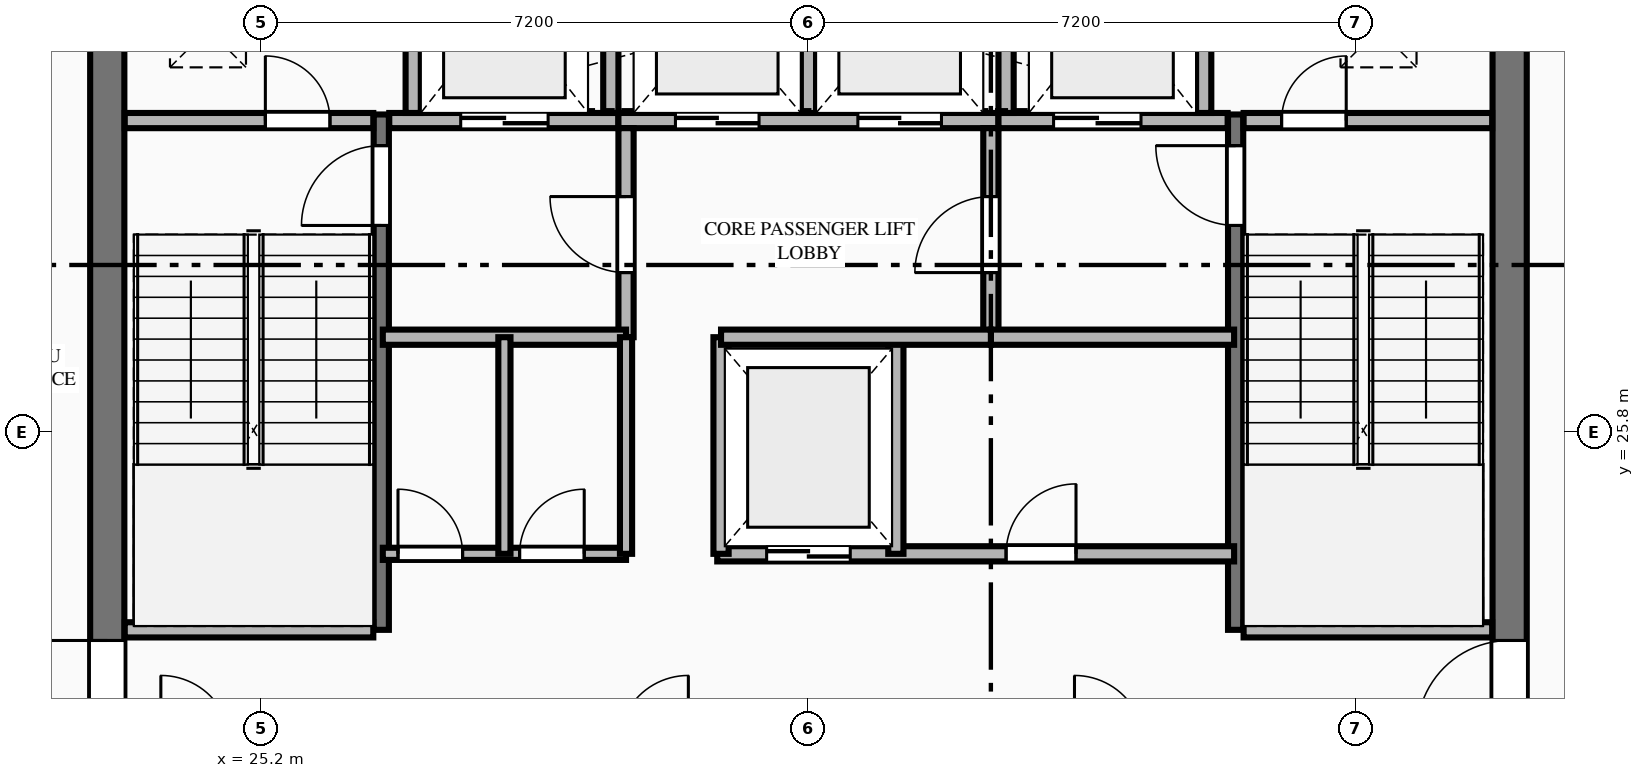
"""IFC4 building model, lengths in metres.
Left out: names, types, materials, properties, quantities, classifications, styles, units other than length and angle.
Written with IfcOpenShell. Run it as: python <this file> out.ifc"""

import sys

from ifc_helpers import new_model, si_unit, direction, frame, frame_2d, origin, place, context, subcontext, project, spatial, rectangle, extrude, element, fill, save


model = new_model("IFC4")
c1 = context("Model", 3, precision=1e-05, world=origin(), true_north=direction((0.0, 1.0)))
c2 = subcontext(c1, "Body", "Model", "MODEL_VIEW")
j1 = project(units=[si_unit("LENGTHUNIT", "METRE"), si_unit("PLANEANGLEUNIT", "RADIAN")], contexts=[c1])
p1 = place(None, origin())
s1 = spatial("IfcSite", under=j1, at=p1, CompositionType="ELEMENT")
p2 = place(p1, origin())
s2 = spatial("IfcBuilding", under=s1, at=p2, CompositionType="ELEMENT")
p3 = place(p2, frame((0.0, 0.0, 287.5)))
s3 = spatial("IfcBuildingStorey", under=s2, at=p3, CompositionType="ELEMENT", Elevation=287.5)
p4 = place(p3, frame((23.175, 19.0, 0.0), z_axis=(0.0, 0.0, 1.0), x_axis=(0.0, 1.0, 0.0)))
e1 = element("IfcWall", 1, at=p4, inside=s3, PredefinedType="SHEAR", context=c2, shape_type="SweptSolid", body=[
    extrude(rectangle(XDim=13.8, YDim=0.45, at=frame_2d((6.9, 0.0))), origin(), (0.0, 0.0, 1.0), 3.8),
])
p5 = place(p4, frame((2.84, 0.0, 0.0)))
e2 = element("IfcOpeningElement", 2, at=p5, cuts=e1, PredefinedType="OPENING", context=c2, shape_type="SweptSolid", body=[
    extrude(rectangle(XDim=1.22, YDim=2.25, at=frame_2d((0.61, 1.125))), frame((0.0, 0.235, 0.0), z_axis=(0.0, -1.0, 0.0), x_axis=(1.0, 0.0, 0.0)), (0.0, 0.0, 1.0), 0.47),
])
p6 = place(p3, frame((41.625, 19.0, 0.0), z_axis=(0.0, 0.0, 1.0), x_axis=(0.0, 1.0, 0.0)))
e3 = element("IfcWall", 3, at=p6, inside=s3, PredefinedType="SHEAR", context=c2, shape_type="SweptSolid", body=[
    extrude(rectangle(XDim=13.8, YDim=0.45, at=frame_2d((6.9, 0.0))), origin(), (0.0, 0.0, 1.0), 3.8),
])
p7 = place(p6, frame((2.84, 0.0, 0.0)))
e4 = element("IfcOpeningElement", 4, at=p7, cuts=e3, PredefinedType="OPENING", context=c2, shape_type="SweptSolid", body=[
    extrude(rectangle(XDim=1.22, YDim=2.25, at=frame_2d((0.61, 1.125))), frame((0.0, 0.235, 0.0), z_axis=(0.0, -1.0, 0.0), x_axis=(1.0, 0.0, 0.0)), (0.0, 0.0, 1.0), 0.47),
])
p8 = place(p3, frame((26.78, 23.2, 0.0), z_axis=(0.0, 0.0, 1.0), x_axis=(0.0, 1.0, 0.0)))
e5 = element("IfcWall", 5, at=p8, inside=s3, PredefinedType="SHEAR", context=c2, shape_type="SweptSolid", body=[
    extrude(rectangle(XDim=6.78, YDim=0.2, at=frame_2d((3.39, 0.0))), origin(), (0.0, 0.0, 1.0), 4.0),
])
p9 = place(p8, frame((5.32, 0.0, 0.0)))
e6 = element("IfcOpeningElement", 6, at=p9, cuts=e5, PredefinedType="OPENING", context=c2, shape_type="SweptSolid", body=[
    extrude(rectangle(XDim=1.05, YDim=2.15, at=frame_2d((0.525, 1.075))), frame((0.0, 0.11, 0.0), z_axis=(0.0, -1.0, 0.0), x_axis=(1.0, 0.0, 0.0)), (0.0, 0.0, 1.0), 0.22),
])
p10 = place(p3, frame((23.405, 23.2, 0.0), z_axis=(0.0, 0.0, 1.0), x_axis=(1.0, 0.0, 0.0)))
e7 = element("IfcWall", 7, at=p10, inside=s3, PredefinedType="PLUMBINGWALL", context=c2, shape_type="SweptSolid", body=[
    extrude(rectangle(XDim=3.27, YDim=0.2, at=frame_2d((1.635, 0.0))), origin(), (0.0, 0.0, 1.0), 3.8),
])
p11 = place(p3, frame((38.02, 23.2, 0.0), z_axis=(0.0, 0.0, 1.0), x_axis=(0.0, 1.0, 0.0)))
e8 = element("IfcWall", 8, at=p11, inside=s3, PredefinedType="SHEAR", context=c2, shape_type="SweptSolid", body=[
    extrude(rectangle(XDim=6.78, YDim=0.2, at=frame_2d((3.39, 0.0))), origin(), (0.0, 0.0, 1.0), 4.0),
])
p12 = place(p11, frame((5.32, 0.0, 0.0)))
e9 = element("IfcOpeningElement", 9, at=p12, cuts=e8, PredefinedType="OPENING", context=c2, shape_type="SweptSolid", body=[
    extrude(rectangle(XDim=1.05, YDim=2.15, at=frame_2d((0.525, 1.075))), frame((0.0, 0.11, 0.0), z_axis=(0.0, -1.0, 0.0), x_axis=(1.0, 0.0, 0.0)), (0.0, 0.0, 1.0), 0.22),
])
p13 = place(p3, frame((38.125, 23.2, 0.0), z_axis=(0.0, 0.0, 1.0), x_axis=(1.0, 0.0, 0.0)))
e10 = element("IfcWall", 10, at=p13, inside=s3, PredefinedType="PLUMBINGWALL", context=c2, shape_type="SweptSolid", body=[
    extrude(rectangle(XDim=3.27, YDim=0.2, at=frame_2d((1.635, 0.0))), origin(), (0.0, 0.0, 1.0), 3.8),
])
p14 = place(p3, frame((23.405, 29.9, 0.0), z_axis=(0.0, 0.0, 1.0), x_axis=(1.0, 0.0, 0.0)))
e11 = element("IfcWall", 11, at=p14, inside=s3, PredefinedType="PLUMBINGWALL", context=c2, shape_type="SweptSolid", body=[
    extrude(rectangle(XDim=3.27, YDim=0.2, at=frame_2d((1.635, 0.0))), origin(), (0.0, 0.0, 1.0), 3.8),
])
p15 = place(p14, frame((1.85, 0.0, 0.0)))
e12 = element("IfcOpeningElement", 12, at=p15, cuts=e11, PredefinedType="OPENING", context=c2, shape_type="SweptSolid", body=[
    extrude(rectangle(XDim=0.85, YDim=2.05, at=frame_2d((0.425, 1.025))), frame((0.0, 0.11, 0.0), z_axis=(0.0, -1.0, 0.0), x_axis=(1.0, 0.0, 0.0)), (0.0, 0.0, 1.0), 0.22),
])
p16 = place(p3, frame((26.885, 29.9, 0.0), z_axis=(0.0, 0.0, 1.0), x_axis=(1.0, 0.0, 0.0)))
e13 = element("IfcWall", 13, at=p16, inside=s3, PredefinedType="PLUMBINGWALL", context=c2, shape_type="SweptSolid", body=[
    extrude(rectangle(XDim=3.015, YDim=0.2, at=frame_2d((1.507, 0.0))), origin(), (0.0, 0.0, 1.0), 3.8),
])
p17 = place(p16, frame((0.94, 0.0, 0.0)))
e14 = element("IfcOpeningElement", 14, at=p17, cuts=e13, PredefinedType="OPENING", context=c2, shape_type="SweptSolid", body=[
    extrude(rectangle(XDim=1.15, YDim=2.2, at=frame_2d((0.575, 1.1))), frame((0.0, 0.11, 0.0), z_axis=(0.0, -1.0, 0.0), x_axis=(1.0, 0.0, 0.0)), (0.0, 0.0, 1.0), 0.22),
])
p18 = place(p3, frame((29.9, 29.9, 0.0), z_axis=(0.0, 0.0, 1.0), x_axis=(1.0, 0.0, 0.0)))
e15 = element("IfcWall", 15, at=p18, inside=s3, PredefinedType="PLUMBINGWALL", context=c2, shape_type="SweptSolid", body=[
    extrude(rectangle(XDim=5.0, YDim=0.2, at=frame_2d((2.5, 0.0))), origin(), (0.0, 0.0, 1.0), 3.8),
])
p19 = place(p18, frame((0.75, 0.0, 0.0)))
e16 = element("IfcOpeningElement", 16, at=p19, cuts=e15, PredefinedType="OPENING", context=c2, shape_type="SweptSolid", body=[
    extrude(rectangle(XDim=1.1, YDim=2.2, at=frame_2d((0.55, 1.1))), frame((0.0, 0.11, 0.0), z_axis=(0.0, -1.0, 0.0), x_axis=(1.0, 0.0, 0.0)), (0.0, 0.0, 1.0), 0.22),
])
p20 = place(p18, frame((3.15, 0.0, 0.0)))
e17 = element("IfcOpeningElement", 17, at=p20, cuts=e15, PredefinedType="OPENING", context=c2, shape_type="SweptSolid", body=[
    extrude(rectangle(XDim=1.1, YDim=2.2, at=frame_2d((0.55, 1.1))), frame((0.0, 0.11, 0.0), z_axis=(0.0, -1.0, 0.0), x_axis=(1.0, 0.0, 0.0)), (0.0, 0.0, 1.0), 0.22),
])
p21 = place(p3, frame((34.9, 29.9, 0.0), z_axis=(0.0, 0.0, 1.0), x_axis=(1.0, 0.0, 0.0)))
e18 = element("IfcWall", 18, at=p21, inside=s3, PredefinedType="PLUMBINGWALL", context=c2, shape_type="SweptSolid", body=[
    extrude(rectangle(XDim=3.015, YDim=0.2, at=frame_2d((1.508, 0.0))), origin(), (0.0, 0.0, 1.0), 3.8),
])
p22 = place(p21, frame((0.725, 0.0, 0.0)))
e19 = element("IfcOpeningElement", 19, at=p22, cuts=e18, PredefinedType="OPENING", context=c2, shape_type="SweptSolid", body=[
    extrude(rectangle(XDim=1.15, YDim=2.2, at=frame_2d((0.575, 1.1))), frame((0.0, 0.11, 0.0), z_axis=(0.0, -1.0, 0.0), x_axis=(1.0, 0.0, 0.0)), (0.0, 0.0, 1.0), 0.22),
])
p23 = place(p3, frame((38.125, 29.9, 0.0), z_axis=(0.0, 0.0, 1.0), x_axis=(1.0, 0.0, 0.0)))
e20 = element("IfcWall", 20, at=p23, inside=s3, PredefinedType="PLUMBINGWALL", context=c2, shape_type="SweptSolid", body=[
    extrude(rectangle(XDim=3.27, YDim=0.2, at=frame_2d((1.635, 0.0))), origin(), (0.0, 0.0, 1.0), 3.8),
])
p24 = place(p23, frame((0.5, 0.0, 0.0)))
e21 = element("IfcOpeningElement", 21, at=p24, cuts=e20, PredefinedType="OPENING", context=c2, shape_type="SweptSolid", body=[
    extrude(rectangle(XDim=0.85, YDim=2.05, at=frame_2d((0.425, 1.025))), frame((0.0, 0.11, 0.0), z_axis=(0.0, -1.0, 0.0), x_axis=(1.0, 0.0, 0.0)), (0.0, 0.0, 1.0), 0.22),
])
for number, where, z_axis, x_axis in (
    (22, (27.2, 30.0, 0.0), (0.0, 0.0, 1.0), (0.0, 1.0, 0.0)),
    (23, (29.8, 30.0, 0.0), (0.0, 0.0, 1.0), (0.0, 1.0, 0.0)),
    (24, (32.4, 30.0, 0.0), (0.0, 0.0, 1.0), (0.0, 1.0, 0.0)),
    (25, (35.0, 30.0, 0.0), (0.0, 0.0, 1.0), (0.0, 1.0, 0.0)),
    (26, (37.6, 30.0, 0.0), (0.0, 0.0, 1.0), (0.0, 1.0, 0.0)),
):
    element("IfcWall", number, at=place(p3, frame(where, z_axis=z_axis, x_axis=x_axis)), inside=s3, PredefinedType="PLUMBINGWALL", context=c2, shape_type="SweptSolid", body=[
        extrude(rectangle(XDim=2.85, YDim=0.2, at=frame_2d((1.425, 0.0))), origin(), (0.0, 0.0, 1.0), 3.8),
    ])
p25 = place(p3, frame((30.0, 27.05, 0.0), z_axis=(0.0, 0.0, 1.0), x_axis=(0.0, 1.0, 0.0)))
e27 = element("IfcWall", 27, at=p25, inside=s3, PredefinedType="PLUMBINGWALL", context=c2, shape_type="SweptSolid", body=[
    extrude(rectangle(XDim=2.75, YDim=0.2, at=frame_2d((1.375, 0.0))), origin(), (0.0, 0.0, 1.0), 3.8),
])
p26 = place(p25, frame((0.85, 0.0, 0.0)))
e28 = element("IfcOpeningElement", 28, at=p26, cuts=e27, PredefinedType="OPENING", context=c2, shape_type="SweptSolid", body=[
    extrude(rectangle(XDim=1.0, YDim=2.15, at=frame_2d((0.5, 1.075))), frame((0.0, 0.11, 0.0), z_axis=(0.0, -1.0, 0.0), x_axis=(1.0, 0.0, 0.0)), (0.0, 0.0, 1.0), 0.22),
])
p27 = place(p3, frame((26.8, 27.05, 0.0), z_axis=(0.0, 0.0, 1.0), x_axis=(1.0, 0.0, 0.0)))
e29 = element("IfcWall", 29, at=p27, inside=s3, PredefinedType="PLUMBINGWALL", context=c2, shape_type="SweptSolid", body=[
    extrude(rectangle(XDim=3.2, YDim=0.2, at=frame_2d((1.6, 0.0))), origin(), (0.0, 0.0, 1.0), 3.8),
])
p28 = place(p3, frame((34.8, 27.05, 0.0), z_axis=(0.0, 0.0, 1.0), x_axis=(0.0, 1.0, 0.0)))
e30 = element("IfcWall", 30, at=p28, inside=s3, PredefinedType="PLUMBINGWALL", context=c2, shape_type="SweptSolid", body=[
    extrude(rectangle(XDim=2.75, YDim=0.2, at=frame_2d((1.375, 0.0))), origin(), (0.0, 0.0, 1.0), 3.8),
])
p29 = place(p28, frame((0.85, 0.0, 0.0)))
e31 = element("IfcOpeningElement", 31, at=p29, cuts=e30, PredefinedType="OPENING", context=c2, shape_type="SweptSolid", body=[
    extrude(rectangle(XDim=1.0, YDim=2.15, at=frame_2d((0.5, 1.075))), frame((0.0, 0.11, 0.0), z_axis=(0.0, -1.0, 0.0), x_axis=(1.0, 0.0, 0.0)), (0.0, 0.0, 1.0), 0.22),
])
p30 = place(p3, frame((34.8, 27.05, 0.0), z_axis=(0.0, 0.0, 1.0), x_axis=(1.0, 0.0, 0.0)))
e32 = element("IfcWall", 32, at=p30, inside=s3, PredefinedType="PLUMBINGWALL", context=c2, shape_type="SweptSolid", body=[
    extrude(rectangle(XDim=3.2, YDim=0.2, at=frame_2d((1.6, 0.0))), origin(), (0.0, 0.0, 1.0), 3.8),
])
p31 = place(p3, frame((26.8, 24.2, 0.0), z_axis=(0.0, 0.0, 1.0), x_axis=(1.0, 0.0, 0.0)))
e33 = element("IfcWall", 33, at=p31, inside=s3, PredefinedType="PARTITIONING", context=c2, shape_type="SweptSolid", body=[
    extrude(rectangle(XDim=3.2, YDim=0.16, at=frame_2d((1.6, 0.0))), origin(), (0.0, 0.0, 1.0), 3.8),
])
p32 = place(p31, frame((0.2, 0.0, 0.0)))
e34 = element("IfcOpeningElement", 34, at=p32, cuts=e33, PredefinedType="OPENING", context=c2, shape_type="SweptSolid", body=[
    extrude(rectangle(XDim=0.85, YDim=2.05, at=frame_2d((0.425, 1.025))), frame((0.0, 0.09, 0.0), z_axis=(0.0, -1.0, 0.0), x_axis=(1.0, 0.0, 0.0)), (0.0, 0.0, 1.0), 0.18),
])
p33 = place(p31, frame((1.8, 0.0, 0.0)))
e35 = element("IfcOpeningElement", 35, at=p33, cuts=e33, PredefinedType="OPENING", context=c2, shape_type="SweptSolid", body=[
    extrude(rectangle(XDim=0.85, YDim=2.05, at=frame_2d((0.425, 1.025))), frame((0.0, 0.09, 0.0), z_axis=(0.0, -1.0, 0.0), x_axis=(1.0, 0.0, 0.0)), (0.0, 0.0, 1.0), 0.18),
])
p34 = place(p3, frame((30.0, 24.2, 0.0), z_axis=(0.0, 0.0, 1.0), x_axis=(0.0, 1.0, 0.0)))
e36 = element("IfcWall", 36, at=p34, inside=s3, PredefinedType="PARTITIONING", context=c2, shape_type="SweptSolid", body=[
    extrude(rectangle(XDim=2.85, YDim=0.16, at=frame_2d((1.425, 0.0))), origin(), (0.0, 0.0, 1.0), 3.8),
])
p35 = place(p3, frame((31.2, 24.2, 0.0), z_axis=(0.0, 0.0, 1.0), x_axis=(1.0, 0.0, 0.0)))
e37 = element("IfcWall", 37, at=p35, inside=s3, PredefinedType="PLUMBINGWALL", context=c2, shape_type="SweptSolid", body=[
    extrude(rectangle(XDim=6.8, YDim=0.2, at=frame_2d((3.4, 0.0))), origin(), (0.0, 0.0, 1.0), 3.8),
])
p36 = place(p35, frame((0.65, 0.0, 0.0)))
e38 = element("IfcOpeningElement", 38, at=p36, cuts=e37, PredefinedType="OPENING", context=c2, shape_type="SweptSolid", body=[
    extrude(rectangle(XDim=1.1, YDim=2.2, at=frame_2d((0.55, 1.1))), frame((0.0, 0.11, 0.0), z_axis=(0.0, -1.0, 0.0), x_axis=(1.0, 0.0, 0.0)), (0.0, 0.0, 1.0), 0.22),
])
p37 = place(p35, frame((3.8, 0.0, 0.0)))
e39 = element("IfcOpeningElement", 39, at=p37, cuts=e37, PredefinedType="OPENING", context=c2, shape_type="SweptSolid", body=[
    extrude(rectangle(XDim=0.92, YDim=2.15, at=frame_2d((0.46, 1.075))), frame((0.0, 0.11, 0.0), z_axis=(0.0, -1.0, 0.0), x_axis=(1.0, 0.0, 0.0)), (0.0, 0.0, 1.0), 0.22),
])
for number, where, z_axis, x_axis in (
    (40, (31.25, 24.2, 0.0), (0.0, 0.0, 1.0), (0.0, 1.0, 0.0)),
    (41, (33.55, 24.2, 0.0), (0.0, 0.0, 1.0), (0.0, 1.0, 0.0)),
):
    element("IfcWall", number, at=place(p3, frame(where, z_axis=z_axis, x_axis=x_axis)), inside=s3, PredefinedType="PLUMBINGWALL", context=c2, shape_type="SweptSolid", body=[
        extrude(rectangle(XDim=2.85, YDim=0.2, at=frame_2d((1.425, 0.0))), origin(), (0.0, 0.0, 1.0), 3.8),
    ])
p38 = place(p3, frame((31.25, 27.05, 0.0), z_axis=(0.0, 0.0, 1.0), x_axis=(1.0, 0.0, 0.0)))
e42 = element("IfcWall", 42, at=p38, inside=s3, PredefinedType="PLUMBINGWALL", context=c2, shape_type="SweptSolid", body=[
    extrude(rectangle(XDim=3.55, YDim=0.2, at=frame_2d((1.775, 0.0))), origin(), (0.0, 0.0, 1.0), 3.8),
])
p39 = place(p3, frame((28.4, 24.2, 0.0), z_axis=(0.0, 0.0, 1.0), x_axis=(0.0, 1.0, 0.0)))
e43 = element("IfcWall", 43, at=p39, inside=s3, PredefinedType="PARTITIONING", context=c2, shape_type="SweptSolid", body=[
    extrude(rectangle(XDim=2.85, YDim=0.16, at=frame_2d((1.425, 0.0))), origin(), (0.0, 0.0, 1.0), 3.8),
])
p40 = place(p5, origin())
e44 = element("IfcDoor", 44, at=p40, inside=s3, OperationType="SINGLE_SWING_RIGHT", PredefinedType="DOOR", context=c2, shape_type="SweptSolid", body=[
    extrude(rectangle(XDim=1.22, YDim=2.25, at=frame_2d((0.61, 1.125))), frame((0.0, 0.025, 0.0), z_axis=(0.0, -1.0, 0.0), x_axis=(1.0, 0.0, 0.0)), (0.0, 0.0, 1.0), 0.05),
])
fill(e2, e44)
p41 = place(p7, origin())
e45 = element("IfcDoor", 45, at=p41, inside=s3, OperationType="SINGLE_SWING_LEFT", PredefinedType="DOOR", context=c2, shape_type="SweptSolid", body=[
    extrude(rectangle(XDim=1.22, YDim=2.25, at=frame_2d((0.61, 1.125))), frame((0.0, 0.025, 0.0), z_axis=(0.0, -1.0, 0.0), x_axis=(1.0, 0.0, 0.0)), (0.0, 0.0, 1.0), 0.05),
])
fill(e4, e45)
p42 = place(p9, origin())
e46 = element("IfcDoor", 46, at=p42, inside=s3, OperationType="SINGLE_SWING_LEFT", PredefinedType="DOOR", context=c2, shape_type="SweptSolid", body=[
    extrude(rectangle(XDim=1.05, YDim=2.15, at=frame_2d((0.525, 1.075))), frame((0.0, 0.025, 0.0), z_axis=(0.0, -1.0, 0.0), x_axis=(1.0, 0.0, 0.0)), (0.0, 0.0, 1.0), 0.05),
])
fill(e6, e46)
p43 = place(p12, origin())
e47 = element("IfcDoor", 47, at=p43, inside=s3, OperationType="SINGLE_SWING_RIGHT", PredefinedType="DOOR", context=c2, shape_type="SweptSolid", body=[
    extrude(rectangle(XDim=1.05, YDim=2.15, at=frame_2d((0.525, 1.075))), frame((0.0, 0.025, 0.0), z_axis=(0.0, -1.0, 0.0), x_axis=(1.0, 0.0, 0.0)), (0.0, 0.0, 1.0), 0.05),
])
fill(e9, e47)
p44 = place(p15, origin())
e48 = element("IfcDoor", 48, at=p44, inside=s3, OperationType="SINGLE_SWING_LEFT", PredefinedType="DOOR", context=c2, shape_type="SweptSolid", body=[
    extrude(rectangle(XDim=0.85, YDim=2.05, at=frame_2d((0.425, 1.025))), frame((0.0, 0.025, 0.0), z_axis=(0.0, -1.0, 0.0), x_axis=(1.0, 0.0, 0.0)), (0.0, 0.0, 1.0), 0.05),
])
fill(e12, e48)
p45 = place(p24, origin())
e49 = element("IfcDoor", 49, at=p45, inside=s3, OperationType="SINGLE_SWING_RIGHT", PredefinedType="DOOR", context=c2, shape_type="SweptSolid", body=[
    extrude(rectangle(XDim=0.85, YDim=2.05, at=frame_2d((0.425, 1.025))), frame((0.0, 0.025, 0.0), z_axis=(0.0, -1.0, 0.0), x_axis=(1.0, 0.0, 0.0)), (0.0, 0.0, 1.0), 0.05),
])
fill(e21, e49)
p46 = place(p17, origin())
e50 = element("IfcDoor", 50, at=p46, inside=s3, OperationType="DOUBLE_DOOR_SLIDING", PredefinedType="DOOR", context=c2, shape_type="SweptSolid", body=[
    extrude(rectangle(XDim=1.15, YDim=2.2, at=frame_2d((0.575, 1.1))), frame((0.0, 0.025, 0.0), z_axis=(0.0, -1.0, 0.0), x_axis=(1.0, 0.0, 0.0)), (0.0, 0.0, 1.0), 0.05),
])
fill(e14, e50)
p47 = place(p22, origin())
e51 = element("IfcDoor", 51, at=p47, inside=s3, OperationType="DOUBLE_DOOR_SLIDING", PredefinedType="DOOR", context=c2, shape_type="SweptSolid", body=[
    extrude(rectangle(XDim=1.15, YDim=2.2, at=frame_2d((0.575, 1.1))), frame((0.0, 0.025, 0.0), z_axis=(0.0, -1.0, 0.0), x_axis=(1.0, 0.0, 0.0)), (0.0, 0.0, 1.0), 0.05),
])
fill(e19, e51)
p48 = place(p19, origin())
e52 = element("IfcDoor", 52, at=p48, inside=s3, OperationType="DOUBLE_DOOR_SLIDING", PredefinedType="DOOR", context=c2, shape_type="SweptSolid", body=[
    extrude(rectangle(XDim=1.1, YDim=2.2, at=frame_2d((0.55, 1.1))), frame((0.0, 0.025, 0.0), z_axis=(0.0, -1.0, 0.0), x_axis=(1.0, 0.0, 0.0)), (0.0, 0.0, 1.0), 0.05),
])
fill(e16, e52)
p49 = place(p20, origin())
e53 = element("IfcDoor", 53, at=p49, inside=s3, OperationType="DOUBLE_DOOR_SLIDING", PredefinedType="DOOR", context=c2, shape_type="SweptSolid", body=[
    extrude(rectangle(XDim=1.1, YDim=2.2, at=frame_2d((0.55, 1.1))), frame((0.0, 0.025, 0.0), z_axis=(0.0, -1.0, 0.0), x_axis=(1.0, 0.0, 0.0)), (0.0, 0.0, 1.0), 0.05),
])
fill(e17, e53)
p50 = place(p26, origin())
e54 = element("IfcDoor", 54, at=p50, inside=s3, OperationType="SINGLE_SWING_RIGHT", PredefinedType="DOOR", context=c2, shape_type="SweptSolid", body=[
    extrude(rectangle(XDim=1.0, YDim=2.15, at=frame_2d((0.5, 1.075))), frame((0.0, 0.025, 0.0), z_axis=(0.0, -1.0, 0.0), x_axis=(1.0, 0.0, 0.0)), (0.0, 0.0, 1.0), 0.05),
])
fill(e28, e54)
p51 = place(p29, origin())
e55 = element("IfcDoor", 55, at=p51, inside=s3, OperationType="SINGLE_SWING_LEFT", PredefinedType="DOOR", context=c2, shape_type="SweptSolid", body=[
    extrude(rectangle(XDim=1.0, YDim=2.15, at=frame_2d((0.5, 1.075))), frame((0.0, 0.025, 0.0), z_axis=(0.0, -1.0, 0.0), x_axis=(1.0, 0.0, 0.0)), (0.0, 0.0, 1.0), 0.05),
])
fill(e31, e55)
p52 = place(p36, origin())
e56 = element("IfcDoor", 56, at=p52, inside=s3, OperationType="DOUBLE_DOOR_SLIDING", PredefinedType="DOOR", context=c2, shape_type="SweptSolid", body=[
    extrude(rectangle(XDim=1.1, YDim=2.2, at=frame_2d((0.55, 1.1))), frame((0.0, 0.025, 0.0), z_axis=(0.0, -1.0, 0.0), x_axis=(1.0, 0.0, 0.0)), (0.0, 0.0, 1.0), 0.05),
])
fill(e38, e56)
p53 = place(p32, origin())
e57 = element("IfcDoor", 57, at=p53, inside=s3, OperationType="SINGLE_SWING_LEFT", PredefinedType="DOOR", context=c2, shape_type="SweptSolid", body=[
    extrude(rectangle(XDim=0.85, YDim=2.05, at=frame_2d((0.425, 1.025))), frame((0.0, 0.025, 0.0), z_axis=(0.0, -1.0, 0.0), x_axis=(1.0, 0.0, 0.0)), (0.0, 0.0, 1.0), 0.05),
])
fill(e34, e57)
p54 = place(p33, origin())
e58 = element("IfcDoor", 58, at=p54, inside=s3, OperationType="SINGLE_SWING_RIGHT", PredefinedType="DOOR", context=c2, shape_type="SweptSolid", body=[
    extrude(rectangle(XDim=0.85, YDim=2.05, at=frame_2d((0.425, 1.025))), frame((0.0, 0.025, 0.0), z_axis=(0.0, -1.0, 0.0), x_axis=(1.0, 0.0, 0.0)), (0.0, 0.0, 1.0), 0.05),
])
fill(e35, e58)
p55 = place(p37, origin())
e59 = element("IfcDoor", 59, at=p55, inside=s3, OperationType="SINGLE_SWING_RIGHT", PredefinedType="DOOR", context=c2, shape_type="SweptSolid", body=[
    extrude(rectangle(XDim=0.92, YDim=2.15, at=frame_2d((0.46, 1.075))), frame((0.0, 0.025, 0.0), z_axis=(0.0, -1.0, 0.0), x_axis=(1.0, 0.0, 0.0)), (0.0, 0.0, 1.0), 0.05),
])
fill(e39, e59)
save(model, sys.argv[1])
